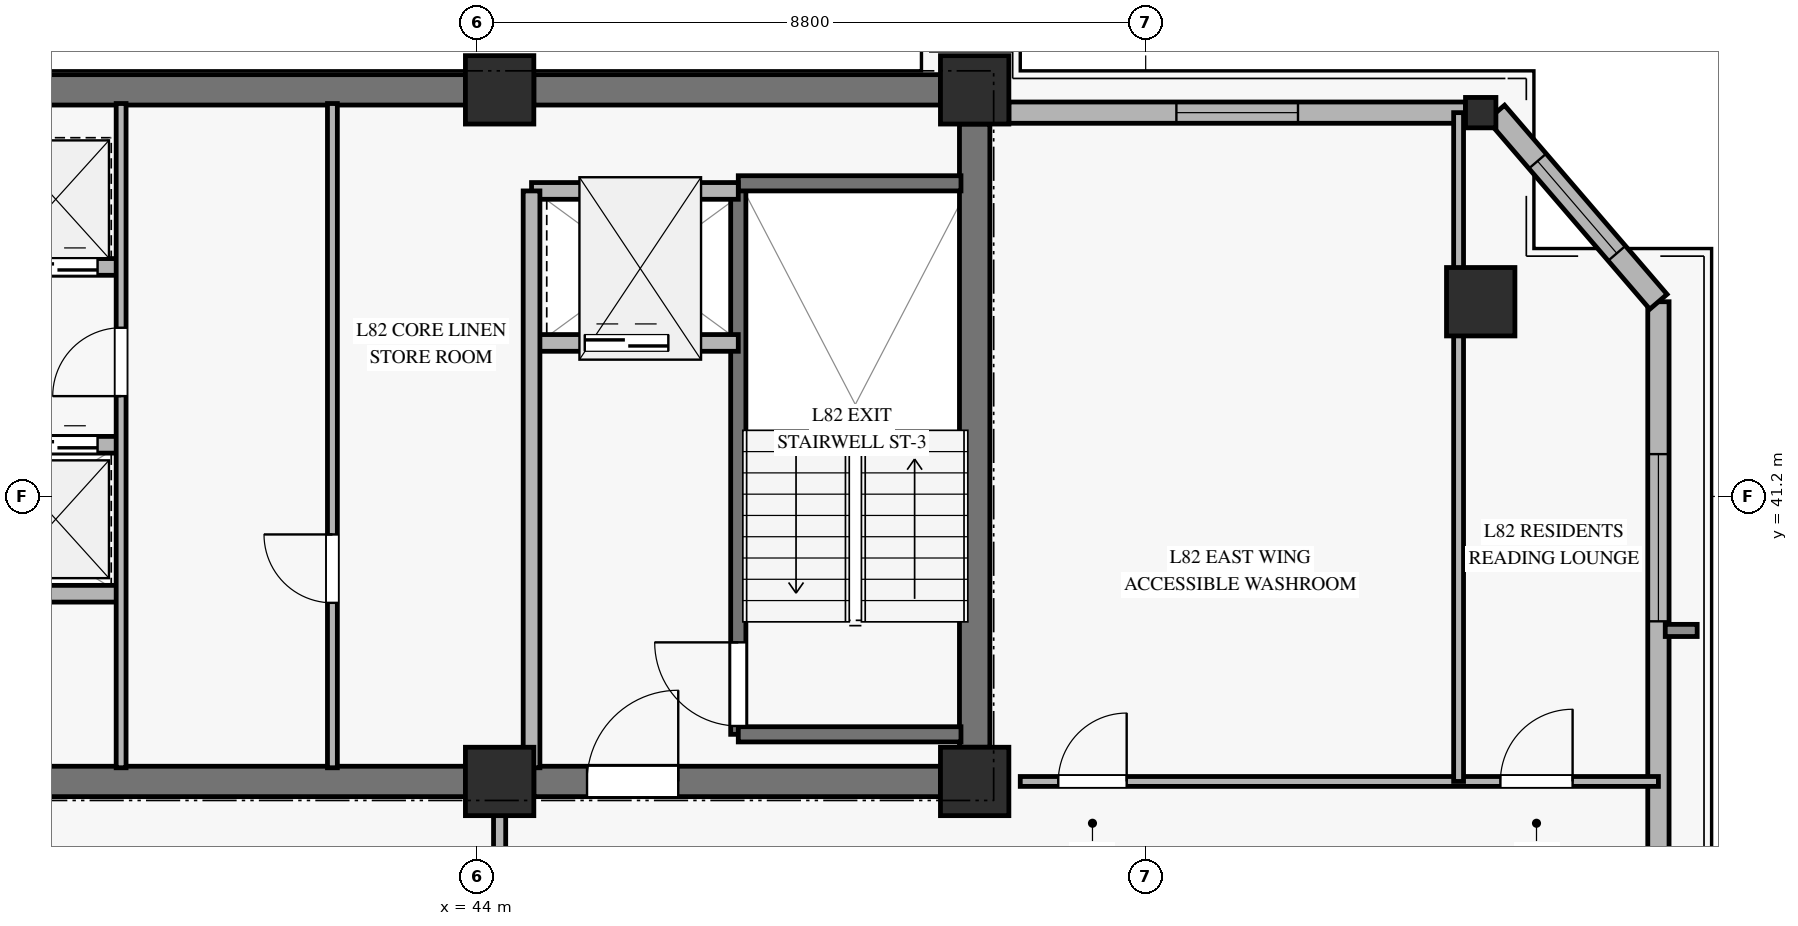
"""IFC4 building model, lengths in metres.
Left out: names, types, materials, properties, quantities, classifications, styles, units other than length and angle.
Written with IfcOpenShell. Run it as: python <this file> out.ifc"""

import sys

from ifc_helpers import new_model, si_unit, direction, frame, frame_2d, origin, origin_2d, place, context, subcontext, project, spatial, rectangle, hollow_rectangle, extrude, source, transform, mapped, element, fill, save


model = new_model("IFC4")
c1 = context("Model", 3, precision=1e-05, world=origin(), true_north=direction((0.0, 1.0)))
c2 = subcontext(c1, "Body", "Model", "MODEL_VIEW")
j1 = project(units=[si_unit("LENGTHUNIT", "METRE"), si_unit("PLANEANGLEUNIT", "RADIAN")], contexts=[c1])
p1 = place(None, origin())
s1 = spatial("IfcSite", under=j1, at=p1, CompositionType="ELEMENT")
p2 = place(p1, origin())
s2 = spatial("IfcBuilding", under=s1, at=p2, CompositionType="ELEMENT")
p3 = place(p2, frame((0.0, 0.0, 317.6)))
s3 = spatial("IfcBuildingStorey", under=s2, at=p3, CompositionType="ELEMENT", Elevation=317.6)
m1 = source(origin(), c2, "Body", "SweptSolid", [
    extrude(rectangle(XDim=0.9, YDim=0.9, at=origin_2d()), origin(), (0.0, 0.0, 1.0), 3.185),
])
for number, where, z_axis, x_axis in (
    (1, (44.3, 37.45, 0.0), (0.0, 0.0, 1.0), (1.0, 0.0, 0.0)),
    (2, (44.3, 46.55, 0.0), (0.0, 0.0, 1.0), (1.0, 0.0, 0.0)),
    (3, (50.55, 37.45, 0.0), (0.0, 0.0, 1.0), (1.0, 0.0, 0.0)),
    (4, (50.55, 46.55, 0.0), (0.0, 0.0, 1.0), (1.0, 0.0, 0.0)),
):
    element("IfcColumn", number, at=place(p3, frame(where, z_axis=z_axis, x_axis=x_axis)), inside=s3, PredefinedType="PILASTER", context=c2, shape_type="MappedRepresentation", body=[
        mapped(m1, transform((0.0, 0.0, 0.0), x_axis=(1.0, 0.0, 0.0), y_axis=(0.0, 1.0, 0.0), z_axis=(0.0, 0.0, 1.0), scale=1.0)),
    ])
p4 = place(p3, frame((36.05, 46.55, 0.0), z_axis=(0.0, 0.0, 1.0), x_axis=(1.0, 0.0, 0.0)))
e5 = element("IfcWall", 5, at=p4, inside=s3, PredefinedType="SHEAR", context=c2, shape_type="SweptSolid", body=[
    extrude(rectangle(XDim=7.8, YDim=0.4, at=frame_2d((3.9, 0.0))), origin(), (0.0, 0.0, 1.0), 3.185),
])
p5 = place(p3, frame((44.75, 46.55, 0.0), z_axis=(0.0, 0.0, 1.0), x_axis=(1.0, 0.0, 0.0)))
e6 = element("IfcWall", 6, at=p5, inside=s3, PredefinedType="SHEAR", context=c2, shape_type="SweptSolid", body=[
    extrude(rectangle(XDim=5.35, YDim=0.4, at=frame_2d((2.675, 0.0))), origin(), (0.0, 0.0, 1.0), 3.185),
])
p6 = place(p3, frame((36.05, 37.45, 0.0), z_axis=(0.0, 0.0, 1.0), x_axis=(1.0, 0.0, 0.0)))
e7 = element("IfcWall", 7, at=p6, inside=s3, PredefinedType="SHEAR", context=c2, shape_type="SweptSolid", body=[
    extrude(rectangle(XDim=7.8, YDim=0.4, at=frame_2d((3.9, 0.0))), origin(), (0.0, 0.0, 1.0), 3.185),
])
p7 = place(p3, frame((44.75, 37.45, 0.0), z_axis=(0.0, 0.0, 1.0), x_axis=(1.0, 0.0, 0.0)))
e8 = element("IfcWall", 8, at=p7, inside=s3, PredefinedType="SHEAR", context=c2, shape_type="SweptSolid", body=[
    extrude(rectangle(XDim=5.35, YDim=0.4, at=frame_2d((2.675, 0.0))), origin(), (0.0, 0.0, 1.0), 3.185),
])
p8 = place(p7, frame((0.7, 0.0, 0.0)))
e9 = element("IfcOpeningElement", 9, at=p8, cuts=e8, PredefinedType="OPENING", context=c2, shape_type="SweptSolid", body=[
    extrude(rectangle(XDim=1.2, YDim=2.15, at=frame_2d((0.6, 1.075))), frame((0.0, 0.21, 0.0), z_axis=(0.0, -1.0, 0.0), x_axis=(1.0, 0.0, 0.0)), (0.0, 0.0, 1.0), 0.42),
])
p9 = place(p3, frame((50.55, 37.9, 0.0), z_axis=(0.0, 0.0, 1.0), x_axis=(0.0, 1.0, 0.0)))
e10 = element("IfcWall", 10, at=p9, inside=s3, PredefinedType="SHEAR", context=c2, shape_type="SweptSolid", body=[
    extrude(rectangle(XDim=8.2, YDim=0.4, at=frame_2d((4.1, 0.0))), origin(), (0.0, 0.0, 1.0), 3.185),
])
m2 = source(origin(), c2, "Body", "SweptSolid", [
    extrude(hollow_rectangle(XDim=0.9, YDim=0.9, WallThickness=0.04, at=origin_2d()), origin(), (0.0, 0.0, 1.0), 3.185),
])
p10 = place(p3, frame((57.208, 43.762, 0.0), z_axis=(0.0, 0.0, 1.0), x_axis=(1.0, 0.0, 0.0)))
e11 = element("IfcColumn", 11, at=p10, inside=s3, PredefinedType="COLUMN", context=c2, shape_type="MappedRepresentation", body=[
    mapped(m2, transform((0.0, 0.0, 0.0), x_axis=(1.0, 0.0, 0.0), y_axis=(0.0, 1.0, 0.0), z_axis=(0.0, 0.0, 1.0), scale=1.0)),
])
m3 = source(origin(), c2, "Body", "SweptSolid", [
    extrude(hollow_rectangle(XDim=0.4, YDim=0.4, WallThickness=0.02, at=origin_2d()), origin(), (0.0, 0.0, 1.0), 3.185),
])
p11 = place(p3, frame((57.208, 46.25, 0.0), z_axis=(0.0, 0.0, 1.0), x_axis=(1.0, 0.0, 0.0)))
e12 = element("IfcColumn", 12, at=p11, inside=s3, PredefinedType="COLUMN", context=c2, shape_type="MappedRepresentation", body=[
    mapped(m3, transform((0.0, 0.0, 0.0), x_axis=(1.0, 0.0, 0.0), y_axis=(0.0, 1.0, 0.0), z_axis=(0.0, 0.0, 1.0), scale=1.0)),
])
p12 = place(p3, frame((59.546, 33.602, 0.0), z_axis=(0.0, 0.0, 1.0), x_axis=(0.0, 1.0, 0.0)))
e13 = element("IfcWall", 13, at=p12, inside=s3, PredefinedType="SOLIDWALL", context=c2, shape_type="SweptSolid", body=[
    extrude(rectangle(XDim=10.16, YDim=0.28, at=frame_2d((5.08, 0.0))), origin(), (0.0, 0.0, 1.0), 2.815),
])
p13 = place(p12, frame((5.955, 0.0, 0.45)))
e14 = element("IfcOpeningElement", 14, at=p13, cuts=e13, PredefinedType="OPENING", context=c2, shape_type="SweptSolid", body=[
    extrude(rectangle(XDim=2.2, YDim=2.1, at=frame_2d((1.1, 1.05))), frame((0.0, 0.15, 0.0), z_axis=(0.0, -1.0, 0.0), x_axis=(1.0, 0.0, 0.0)), (0.0, 0.0, 1.0), 0.3),
])
p14 = place(p3, frame((51.0, 46.25, 0.0), z_axis=(0.0, 0.0, 1.0), x_axis=(1.0, 0.0, 0.0)))
e15 = element("IfcWall", 15, at=p14, inside=s3, PredefinedType="SOLIDWALL", context=c2, shape_type="SweptSolid", body=[
    extrude(rectangle(XDim=6.008, YDim=0.28, at=frame_2d((3.004, 0.0))), origin(), (0.0, 0.0, 1.0), 2.815),
])
p15 = place(p14, frame((2.204, 0.0, 0.45)))
e16 = element("IfcOpeningElement", 16, at=p15, cuts=e15, PredefinedType="OPENING", context=c2, shape_type="SweptSolid", body=[
    extrude(rectangle(XDim=1.6, YDim=2.0, at=frame_2d((0.8, 1.0))), frame((0.0, 0.15, 0.0), z_axis=(0.0, -1.0, 0.0), x_axis=(1.0, 0.0, 0.0)), (0.0, 0.0, 1.0), 0.3),
])
p16 = place(p3, frame((59.546, 43.762, 0.0), z_axis=(0.0, 0.0, 1.0), x_axis=(-0.65172861611, 0.758452246977, 0.0)))
e17 = element("IfcWall", 17, at=p16, inside=s3, PredefinedType="SOLIDWALL", context=c2, shape_type="SweptSolid", body=[
    extrude(rectangle(XDim=3.281, YDim=0.3, at=frame_2d((1.64, 0.0))), origin(), (0.0, 0.0, 1.0), 2.815),
])
p17 = place(p16, frame((0.84, 0.0, 0.45)))
e18 = element("IfcOpeningElement", 18, at=p17, cuts=e17, PredefinedType="OPENING", context=c2, shape_type="SweptSolid", body=[
    extrude(rectangle(XDim=1.6, YDim=2.0, at=frame_2d((0.8, 1.0))), frame((0.0, 0.16, 0.0), z_axis=(0.0, -1.0, 0.0), x_axis=(1.0, 0.0, 0.0)), (0.0, 0.0, 1.0), 0.32),
])
p18 = place(p3, frame((47.44, 38.07, 0.0), z_axis=(0.0, 0.0, 1.0), x_axis=(0.0, 1.0, 0.0)))
e19 = element("IfcWall", 19, at=p18, inside=s3, PredefinedType="SOLIDWALL", context=c2, shape_type="SweptSolid", body=[
    extrude(rectangle(XDim=7.25, YDim=0.2, at=frame_2d((3.625, 0.0))), origin(), (0.0, 0.0, 1.0), 3.4),
])
p19 = place(p18, frame((0.11, 0.0, 0.0)))
e20 = element("IfcOpeningElement", 20, at=p19, cuts=e19, PredefinedType="OPENING", context=c2, shape_type="SweptSolid", body=[
    extrude(rectangle(XDim=1.1, YDim=2.15, at=frame_2d((0.55, 1.075))), frame((0.0, 0.11, 0.0), z_axis=(0.0, -1.0, 0.0), x_axis=(1.0, 0.0, 0.0)), (0.0, 0.0, 1.0), 0.22),
])
for number, where, z_axis, x_axis in (
    (21, (47.44, 45.32, 0.0), (0.0, 0.0, 1.0), (1.0, 0.0, 0.0)),
    (22, (47.44, 38.07, 0.0), (0.0, 0.0, 1.0), (1.0, 0.0, 0.0)),
):
    element("IfcWall", number, at=place(p3, frame(where, z_axis=z_axis, x_axis=x_axis)), inside=s3, PredefinedType="SOLIDWALL", context=c2, shape_type="SweptSolid", body=[
        extrude(rectangle(XDim=2.93, YDim=0.2, at=frame_2d((1.465, 0.0))), origin(), (0.0, 0.0, 1.0), 3.4),
    ])
p20 = place(p3, frame((44.72, 43.22, 0.0), z_axis=(0.0, 0.0, 1.0), x_axis=(1.0, 0.0, 0.0)))
e23 = element("IfcWall", 23, at=p20, inside=s3, PredefinedType="SOLIDWALL", context=c2, shape_type="SweptSolid", body=[
    extrude(rectangle(XDim=2.72, YDim=0.22, at=frame_2d((1.36, 0.0))), origin(), (0.0, 0.0, 1.0), 3.185),
])
p21 = place(p20, frame((0.7, 0.0, 0.0)))
e24 = element("IfcOpeningElement", 24, at=p21, cuts=e23, PredefinedType="OPENING", context=c2, shape_type="SweptSolid", body=[
    extrude(rectangle(XDim=1.1, YDim=2.2, at=frame_2d((0.55, 1.1))), frame((0.0, 0.12, 0.0), z_axis=(0.0, -1.0, 0.0), x_axis=(1.0, 0.0, 0.0)), (0.0, 0.0, 1.0), 0.24),
])
p22 = place(p3, frame((44.72, 45.22, 0.0), z_axis=(0.0, 0.0, 1.0), x_axis=(1.0, 0.0, 0.0)))
e25 = element("IfcWall", 25, at=p22, inside=s3, PredefinedType="SOLIDWALL", context=c2, shape_type="SweptSolid", body=[
    extrude(rectangle(XDim=2.72, YDim=0.22, at=frame_2d((1.36, 0.0))), origin(), (0.0, 0.0, 1.0), 3.185),
])
p23 = place(p3, frame((44.72, 37.63, 0.0), z_axis=(0.0, 0.0, 1.0), x_axis=(0.0, 1.0, 0.0)))
e26 = element("IfcWall", 26, at=p23, inside=s3, PredefinedType="SOLIDWALL", context=c2, shape_type="SweptSolid", body=[
    extrude(rectangle(XDim=7.59, YDim=0.22, at=frame_2d((3.795, 0.0))), origin(), (0.0, 0.0, 1.0), 3.185),
])
p24 = place(p3, frame((36.12, 44.22, 0.0), z_axis=(0.0, 0.0, 1.0), x_axis=(1.0, 0.0, 0.0)))
e27 = element("IfcWall", 27, at=p24, inside=s3, PredefinedType="SOLIDWALL", context=c2, shape_type="SweptSolid", body=[
    extrude(rectangle(XDim=3.2, YDim=0.22, at=frame_2d((1.6, 0.0))), origin(), (0.0, 0.0, 1.0), 3.185),
])
p25 = place(p24, frame((0.3, 0.0, 0.0)))
e28 = element("IfcOpeningElement", 28, at=p25, cuts=e27, PredefinedType="OPENING", context=c2, shape_type="SweptSolid", body=[
    extrude(rectangle(XDim=1.1, YDim=2.2, at=frame_2d((0.55, 1.1))), frame((0.0, 0.12, 0.0), z_axis=(0.0, -1.0, 0.0), x_axis=(1.0, 0.0, 0.0)), (0.0, 0.0, 1.0), 0.24),
])
p26 = place(p24, frame((1.79, 0.0, 0.0)))
e29 = element("IfcOpeningElement", 29, at=p26, cuts=e27, PredefinedType="OPENING", context=c2, shape_type="SweptSolid", body=[
    extrude(rectangle(XDim=1.1, YDim=2.2, at=frame_2d((0.55, 1.1))), frame((0.0, 0.12, 0.0), z_axis=(0.0, -1.0, 0.0), x_axis=(1.0, 0.0, 0.0)), (0.0, 0.0, 1.0), 0.24),
])
p27 = place(p3, frame((36.12, 41.88, 0.0), z_axis=(0.0, 0.0, 1.0), x_axis=(1.0, 0.0, 0.0)))
e30 = element("IfcWall", 30, at=p27, inside=s3, PredefinedType="SOLIDWALL", context=c2, shape_type="SweptSolid", body=[
    extrude(rectangle(XDim=3.2, YDim=0.22, at=frame_2d((1.6, 0.0))), origin(), (0.0, 0.0, 1.0), 3.185),
])
p28 = place(p27, frame((0.3, 0.0, 0.0)))
e31 = element("IfcOpeningElement", 31, at=p28, cuts=e30, PredefinedType="OPENING", context=c2, shape_type="SweptSolid", body=[
    extrude(rectangle(XDim=1.1, YDim=2.2, at=frame_2d((0.55, 1.1))), frame((0.0, 0.12, 0.0), z_axis=(0.0, -1.0, 0.0), x_axis=(1.0, 0.0, 0.0)), (0.0, 0.0, 1.0), 0.24),
])
p29 = place(p27, frame((1.79, 0.0, 0.0)))
e32 = element("IfcOpeningElement", 32, at=p29, cuts=e30, PredefinedType="OPENING", context=c2, shape_type="SweptSolid", body=[
    extrude(rectangle(XDim=1.1, YDim=2.2, at=frame_2d((0.55, 1.1))), frame((0.0, 0.12, 0.0), z_axis=(0.0, -1.0, 0.0), x_axis=(1.0, 0.0, 0.0)), (0.0, 0.0, 1.0), 0.24),
])
p30 = place(p3, frame((36.12, 39.92, 0.0), z_axis=(0.0, 0.0, 1.0), x_axis=(1.0, 0.0, 0.0)))
e33 = element("IfcWall", 33, at=p30, inside=s3, PredefinedType="SOLIDWALL", context=c2, shape_type="SweptSolid", body=[
    extrude(rectangle(XDim=3.2, YDim=0.22, at=frame_2d((1.6, 0.0))), origin(), (0.0, 0.0, 1.0), 3.185),
])
p31 = place(p3, frame((39.32, 37.63, 0.0), z_axis=(0.0, 0.0, 1.0), x_axis=(0.0, 1.0, 0.0)))
e34 = element("IfcWall", 34, at=p31, inside=s3, PredefinedType="PARTITIONING", context=c2, shape_type="SweptSolid", body=[
    extrude(rectangle(XDim=8.74, YDim=0.13, at=frame_2d((4.37, 0.0))), origin(), (0.0, 0.0, 1.0), 3.185),
])
p32 = place(p31, frame((4.89, 0.0, 0.0)))
e35 = element("IfcOpeningElement", 35, at=p32, cuts=e34, PredefinedType="OPENING", context=c2, shape_type="SweptSolid", body=[
    extrude(rectangle(XDim=0.9, YDim=2.1, at=frame_2d((0.45, 1.05))), frame((0.0, 0.075, 0.0), z_axis=(0.0, -1.0, 0.0), x_axis=(1.0, 0.0, 0.0)), (0.0, 0.0, 1.0), 0.15),
])
p33 = place(p3, frame((42.1, 37.63, 0.0), z_axis=(0.0, 0.0, 1.0), x_axis=(0.0, 1.0, 0.0)))
e36 = element("IfcWall", 36, at=p33, inside=s3, PredefinedType="PARTITIONING", context=c2, shape_type="SweptSolid", body=[
    extrude(rectangle(XDim=8.74, YDim=0.13, at=frame_2d((4.37, 0.0))), origin(), (0.0, 0.0, 1.0), 3.185),
])
p34 = place(p33, frame((2.17, 0.0, 0.0)))
e37 = element("IfcOpeningElement", 37, at=p34, cuts=e36, PredefinedType="OPENING", context=c2, shape_type="SweptSolid", body=[
    extrude(rectangle(XDim=0.9, YDim=2.1, at=frame_2d((0.45, 1.05))), frame((0.0, 0.075, 0.0), z_axis=(0.0, -1.0, 0.0), x_axis=(1.0, 0.0, 0.0)), (0.0, 0.0, 1.0), 0.15),
])
p35 = place(p3, frame((44.3, 20.704, 0.0), z_axis=(0.0, 0.0, 1.0), x_axis=(0.0, 1.0, 0.0)))
e38 = element("IfcWall", 38, at=p35, inside=s3, PredefinedType="PARTITIONING", context=c2, shape_type="SweptSolid", body=[
    extrude(rectangle(XDim=16.746, YDim=0.16, at=frame_2d((8.373, 0.0))), origin(), (0.0, 0.0, 1.0), 2.47),
])
p36 = place(p35, frame((13.766, 0.0, 0.0)))
e39 = element("IfcOpeningElement", 39, at=p36, cuts=e38, PredefinedType="OPENING", context=c2, shape_type="SweptSolid", body=[
    extrude(rectangle(XDim=1.05, YDim=2.15, at=frame_2d((0.525, 1.075))), frame((0.0, 0.09, 0.0), z_axis=(0.0, -1.0, 0.0), x_axis=(1.0, 0.0, 0.0)), (0.0, 0.0, 1.0), 0.18),
])
p37 = place(p3, frame((51.15, 37.45, 0.0), z_axis=(0.0, 0.0, 1.0), x_axis=(1.0, 0.0, 0.0)))
e40 = element("IfcWall", 40, at=p37, inside=s3, PredefinedType="PARTITIONING", context=c2, shape_type="SweptSolid", body=[
    extrude(rectangle(XDim=8.396, YDim=0.13, at=frame_2d((4.198, 0.0))), origin(), (0.0, 0.0, 1.0), 2.82),
])
p38 = place(p37, frame((0.5, 0.0, 0.0)))
e41 = element("IfcOpeningElement", 41, at=p38, cuts=e40, PredefinedType="OPENING", context=c2, shape_type="SweptSolid", body=[
    extrude(rectangle(XDim=0.9, YDim=2.1, at=frame_2d((0.45, 1.05))), frame((0.0, 0.075, 0.0), z_axis=(0.0, -1.0, 0.0), x_axis=(1.0, 0.0, 0.0)), (0.0, 0.0, 1.0), 0.15),
])
p39 = place(p37, frame((6.317, 0.0, 0.0)))
e42 = element("IfcOpeningElement", 42, at=p39, cuts=e40, PredefinedType="OPENING", context=c2, shape_type="SweptSolid", body=[
    extrude(rectangle(XDim=0.95, YDim=2.1, at=frame_2d((0.475, 1.05))), frame((0.0, 0.075, 0.0), z_axis=(0.0, -1.0, 0.0), x_axis=(1.0, 0.0, 0.0)), (0.0, 0.0, 1.0), 0.15),
])
p40 = place(p3, frame((56.917, 37.45, 0.0), z_axis=(0.0, 0.0, 1.0), x_axis=(0.0, 1.0, 0.0)))
e43 = element("IfcWall", 43, at=p40, inside=s3, PredefinedType="PARTITIONING", context=c2, shape_type="SweptSolid", body=[
    extrude(rectangle(XDim=8.8, YDim=0.13, at=frame_2d((4.4, 0.0))), origin(), (0.0, 0.0, 1.0), 2.82),
])
m4 = source(origin(), c2, "Body", "SweptSolid", [
    extrude(rectangle(XDim=2.2, YDim=2.1, at=frame_2d((1.1, 1.05))), frame((0.0, 0.03, 0.0), z_axis=(0.0, -1.0, 0.0), x_axis=(1.0, 0.0, 0.0)), (0.0, 0.0, 1.0), 0.06),
])
p41 = place(p13, origin())
e44 = element("IfcWindow", 44, at=p41, inside=s3, PartitioningType="SINGLE_PANEL", PredefinedType="WINDOW", context=c2, shape_type="MappedRepresentation", body=[
    mapped(m4, transform((0.0, 0.0, 0.0), x_axis=(1.0, 0.0, 0.0), y_axis=(0.0, 1.0, 0.0), z_axis=(0.0, 0.0, 1.0), scale=1.0)),
])
fill(e14, e44)
m5 = source(origin(), c2, "Body", "SweptSolid", [
    extrude(rectangle(XDim=1.6, YDim=2.0, at=frame_2d((0.8, 1.0))), frame((0.0, 0.03, 0.0), z_axis=(0.0, -1.0, 0.0), x_axis=(1.0, 0.0, 0.0)), (0.0, 0.0, 1.0), 0.06),
])
p42 = place(p15, origin())
e45 = element("IfcWindow", 45, at=p42, inside=s3, PartitioningType="SINGLE_PANEL", PredefinedType="WINDOW", context=c2, shape_type="MappedRepresentation", body=[
    mapped(m5, transform((0.0, 0.0, 0.0), x_axis=(1.0, 0.0, 0.0), y_axis=(0.0, 1.0, 0.0), z_axis=(0.0, 0.0, 1.0), scale=1.0)),
])
fill(e16, e45)
p43 = place(p17, origin())
e46 = element("IfcWindow", 46, at=p43, inside=s3, PartitioningType="SINGLE_PANEL", PredefinedType="WINDOW", context=c2, shape_type="MappedRepresentation", body=[
    mapped(m5, transform((0.0, 0.0, 0.0), x_axis=(1.0, 0.0, 0.0), y_axis=(0.0, 1.0, 0.0), z_axis=(0.0, 0.0, 1.0), scale=1.0)),
])
fill(e18, e46)
m6 = source(origin(), c2, "Body", "SweptSolid", [
    extrude(rectangle(XDim=1.1, YDim=2.15, at=frame_2d((0.55, 1.075))), frame((0.0, 0.025, 0.0), z_axis=(0.0, -1.0, 0.0), x_axis=(1.0, 0.0, 0.0)), (0.0, 0.0, 1.0), 0.05),
])
p44 = place(p19, origin())
e47 = element("IfcDoor", 47, at=p44, inside=s3, OperationType="SINGLE_SWING_RIGHT", PredefinedType="DOOR", context=c2, shape_type="MappedRepresentation", body=[
    mapped(m6, transform((0.0, 0.0, 0.0), x_axis=(1.0, 0.0, 0.0), y_axis=(0.0, 1.0, 0.0), z_axis=(0.0, 0.0, 1.0), scale=1.0)),
])
fill(e20, e47)
m7 = source(origin(), c2, "Body", "SweptSolid", [
    extrude(rectangle(XDim=1.1, YDim=2.2, at=frame_2d((0.55, 1.1))), frame((0.0, 0.025, 0.0), z_axis=(0.0, -1.0, 0.0), x_axis=(1.0, 0.0, 0.0)), (0.0, 0.0, 1.0), 0.05),
])
p45 = place(p21, origin())
e48 = element("IfcDoor", 48, at=p45, inside=s3, OperationType="SLIDING_TO_LEFT", PredefinedType="DOOR", context=c2, shape_type="MappedRepresentation", body=[
    mapped(m7, transform((0.0, 0.0, 0.0), x_axis=(1.0, 0.0, 0.0), y_axis=(0.0, 1.0, 0.0), z_axis=(0.0, 0.0, 1.0), scale=1.0)),
])
fill(e24, e48)
m8 = source(origin(), c2, "Body", "SweptSolid", [
    extrude(rectangle(XDim=1.2, YDim=2.15, at=frame_2d((0.6, 1.075))), frame((0.0, 0.025, 0.0), z_axis=(0.0, -1.0, 0.0), x_axis=(1.0, 0.0, 0.0)), (0.0, 0.0, 1.0), 0.05),
])
p46 = place(p8, origin())
e49 = element("IfcDoor", 49, at=p46, inside=s3, OperationType="SINGLE_SWING_RIGHT", PredefinedType="DOOR", context=c2, shape_type="MappedRepresentation", body=[
    mapped(m8, transform((0.0, 0.0, 0.0), x_axis=(1.0, 0.0, 0.0), y_axis=(0.0, 1.0, 0.0), z_axis=(0.0, 0.0, 1.0), scale=1.0)),
])
fill(e9, e49)
p47 = place(p26, origin())
e50 = element("IfcDoor", 50, at=p47, inside=s3, OperationType="SLIDING_TO_LEFT", PredefinedType="DOOR", context=c2, shape_type="MappedRepresentation", body=[
    mapped(m7, transform((0.0, 0.0, 0.0), x_axis=(1.0, 0.0, 0.0), y_axis=(0.0, 1.0, 0.0), z_axis=(0.0, 0.0, 1.0), scale=1.0)),
])
fill(e29, e50)
p48 = place(p29, origin())
e51 = element("IfcDoor", 51, at=p48, inside=s3, OperationType="SLIDING_TO_LEFT", PredefinedType="DOOR", context=c2, shape_type="MappedRepresentation", body=[
    mapped(m7, transform((0.0, 0.0, 0.0), x_axis=(1.0, 0.0, 0.0), y_axis=(0.0, 1.0, 0.0), z_axis=(0.0, 0.0, 1.0), scale=1.0)),
])
fill(e32, e51)
m9 = source(origin(), c2, "Body", "SweptSolid", [
    extrude(rectangle(XDim=0.9, YDim=2.1, at=frame_2d((0.45, 1.05))), frame((0.0, 0.025, 0.0), z_axis=(0.0, -1.0, 0.0), x_axis=(1.0, 0.0, 0.0)), (0.0, 0.0, 1.0), 0.05),
])
p49 = place(p32, origin())
e52 = element("IfcDoor", 52, at=p49, inside=s3, OperationType="SINGLE_SWING_LEFT", PredefinedType="DOOR", context=c2, shape_type="MappedRepresentation", body=[
    mapped(m9, transform((0.0, 0.0, 0.0), x_axis=(1.0, 0.0, 0.0), y_axis=(0.0, 1.0, 0.0), z_axis=(0.0, 0.0, 1.0), scale=1.0)),
])
fill(e35, e52)
p50 = place(p34, origin())
e53 = element("IfcDoor", 53, at=p50, inside=s3, OperationType="SINGLE_SWING_RIGHT", PredefinedType="DOOR", context=c2, shape_type="MappedRepresentation", body=[
    mapped(m9, transform((0.0, 0.0, 0.0), x_axis=(1.0, 0.0, 0.0), y_axis=(0.0, 1.0, 0.0), z_axis=(0.0, 0.0, 1.0), scale=1.0)),
])
fill(e37, e53)
p51 = place(p38, origin())
e54 = element("IfcDoor", 54, at=p51, inside=s3, OperationType="SINGLE_SWING_RIGHT", PredefinedType="DOOR", context=c2, shape_type="MappedRepresentation", body=[
    mapped(m9, transform((0.0, 0.0, 0.0), x_axis=(1.0, 0.0, 0.0), y_axis=(0.0, 1.0, 0.0), z_axis=(0.0, 0.0, 1.0), scale=1.0)),
])
fill(e41, e54)
m10 = source(origin(), c2, "Body", "SweptSolid", [
    extrude(rectangle(XDim=0.95, YDim=2.1, at=frame_2d((0.475, 1.05))), frame((0.0, 0.025, 0.0), z_axis=(0.0, -1.0, 0.0), x_axis=(1.0, 0.0, 0.0)), (0.0, 0.0, 1.0), 0.05),
])
p52 = place(p39, origin())
e55 = element("IfcDoor", 55, at=p52, inside=s3, OperationType="SINGLE_SWING_RIGHT", PredefinedType="DOOR", context=c2, shape_type="MappedRepresentation", body=[
    mapped(m10, transform((0.0, 0.0, 0.0), x_axis=(1.0, 0.0, 0.0), y_axis=(0.0, 1.0, 0.0), z_axis=(0.0, 0.0, 1.0), scale=1.0)),
])
fill(e42, e55)
save(model, sys.argv[1])
